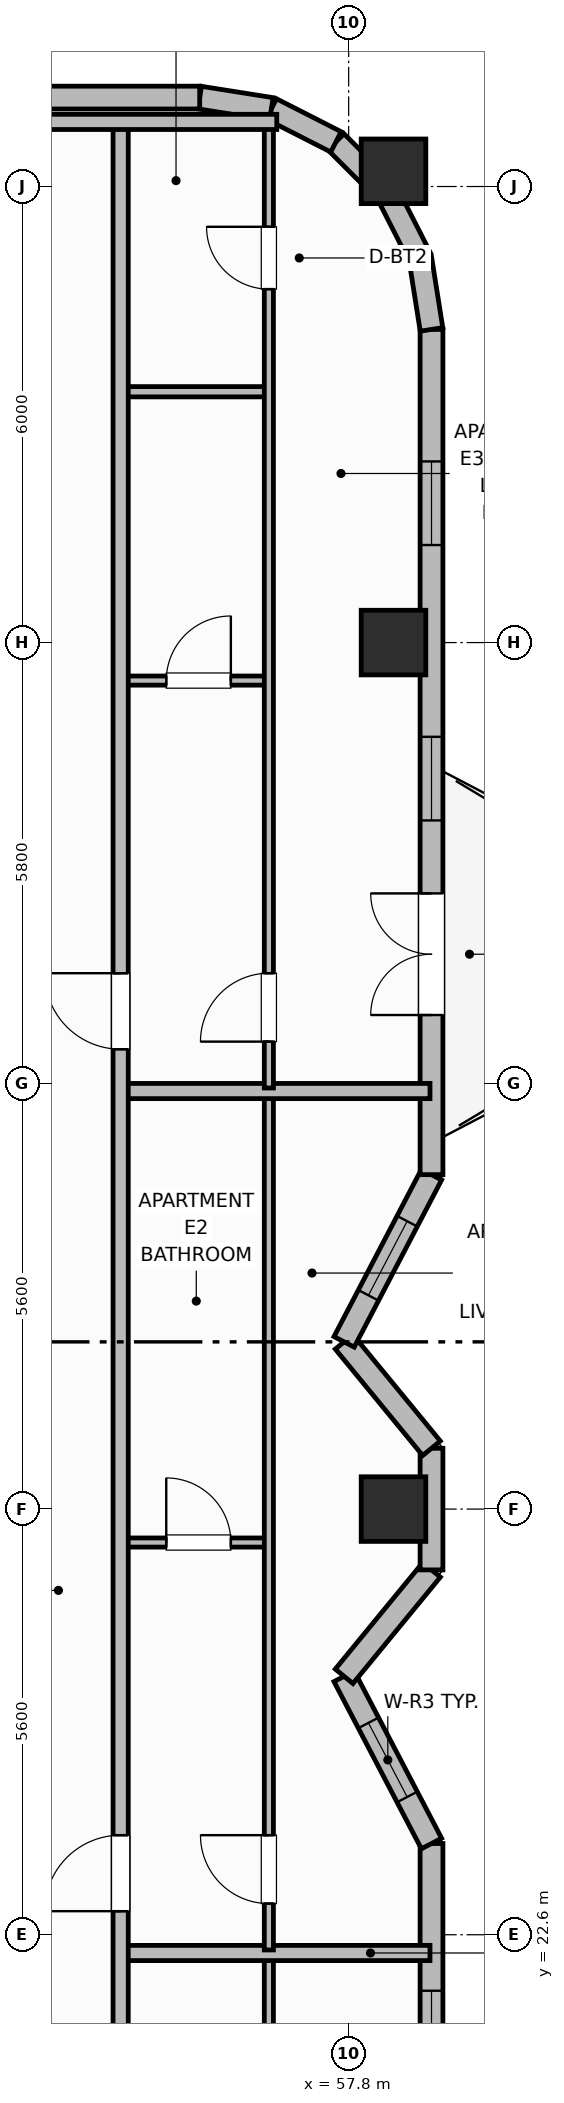
"""IFC4 building model, lengths in metres.
Left out: names, types, materials, properties, quantities, classifications, styles, units other than length and angle.
Written with IfcOpenShell. Run it as: python <this file> out.ifc"""

import sys

from ifc_helpers import new_model, si_unit, direction, frame, frame_2d, origin, origin_2d, place, context, subcontext, project, spatial, rectangle, extrude, element, fill, save


model = new_model("IFC4")
c1 = context("Model", 3, precision=1e-05, world=origin(), true_north=direction((0.0, 1.0)))
c2 = subcontext(c1, "Body", "Model", "MODEL_VIEW")
j1 = project(units=[si_unit("LENGTHUNIT", "METRE"), si_unit("PLANEANGLEUNIT", "RADIAN")], contexts=[c1])
p1 = place(None, origin())
s1 = spatial("IfcSite", under=j1, at=p1, CompositionType="ELEMENT")
p2 = place(p1, origin())
s2 = spatial("IfcBuilding", under=s1, at=p2, CompositionType="ELEMENT")
p3 = place(p2, frame((0.0, 0.0, 244.3)))
s3 = spatial("IfcBuildingStorey", under=s2, at=p3, CompositionType="ELEMENT", Elevation=244.3)
for number, where, z_axis, x_axis in (
    (1, (58.39, 28.2, 0.0), (0.0, 0.0, 1.0), (1.0, 0.0, 0.0)),
    (2, (58.39, 39.6, 0.0), (0.0, 0.0, 1.0), (1.0, 0.0, 0.0)),
    (3, (58.39, 45.8, 0.0), (0.0, 0.0, 1.0), (1.0, 0.0, 0.0)),
):
    element("IfcColumn", number, at=place(p3, frame(where, z_axis=z_axis, x_axis=x_axis)), inside=s3, PredefinedType="COLUMN", context=c2, shape_type="SweptSolid", body=[
        extrude(rectangle(XDim=0.85, YDim=0.85, at=origin_2d()), origin(), (0.0, 0.0, 1.0), 3.7),
    ])
p4 = place(p3, frame((58.89, 12.68, 0.0), z_axis=(0.0, 0.0, 1.0), x_axis=(0.0, 1.0, 0.0)))
e4 = element("IfcWall", 4, at=p4, inside=s3, PredefinedType="SOLIDWALL", context=c2, shape_type="SweptSolid", body=[
    extrude(rectangle(XDim=11.12, YDim=0.3, at=frame_2d((5.56, 0.0))), origin(), (0.0, 0.0, 1.0), 2.73),
])
p5 = place(p4, frame((1.237, 0.0, 0.76)))
e5 = element("IfcOpeningElement", 5, at=p5, cuts=e4, PredefinedType="OPENING", context=c2, shape_type="SweptSolid", body=[
    extrude(rectangle(XDim=1.4, YDim=1.85, at=frame_2d((0.7, 0.925))), frame((0.0, 0.16, 0.0), z_axis=(0.0, -1.0, 0.0), x_axis=(1.0, 0.0, 0.0)), (0.0, 0.0, 1.0), 0.32),
])
p6 = place(p4, frame((5.56, 0.0, 0.76)))
e6 = element("IfcOpeningElement", 6, at=p6, cuts=e4, PredefinedType="OPENING", context=c2, shape_type="SweptSolid", body=[
    extrude(rectangle(XDim=1.4, YDim=1.85, at=frame_2d((0.7, 0.925))), frame((0.0, 0.16, 0.0), z_axis=(0.0, -1.0, 0.0), x_axis=(1.0, 0.0, 0.0)), (0.0, 0.0, 1.0), 0.32),
])
p7 = place(p4, frame((7.783, 0.0, 0.76)))
e7 = element("IfcOpeningElement", 7, at=p7, cuts=e4, PredefinedType="OPENING", context=c2, shape_type="SweptSolid", body=[
    extrude(rectangle(XDim=1.4, YDim=1.85, at=frame_2d((0.7, 0.925))), frame((0.0, 0.16, 0.0), z_axis=(0.0, -1.0, 0.0), x_axis=(1.0, 0.0, 0.0)), (0.0, 0.0, 1.0), 0.32),
])
p8 = place(p3, frame((58.89, 23.8, 0.0), z_axis=(0.0, 0.0, 1.0), x_axis=(-0.46323138706, 0.886237373418, 0.0)))
e8 = element("IfcWall", 8, at=p8, inside=s3, PredefinedType="SOLIDWALL", context=c2, shape_type="SweptSolid", body=[
    extrude(rectangle(XDim=2.482, YDim=0.3, at=frame_2d((1.241, 0.0))), origin(), (0.0, 0.0, 1.0), 2.73),
])
p9 = place(p8, frame((0.691, 0.0, 0.92)))
e9 = element("IfcOpeningElement", 9, at=p9, cuts=e8, PredefinedType="OPENING", context=c2, shape_type="SweptSolid", body=[
    extrude(rectangle(XDim=1.1, YDim=1.65, at=frame_2d((0.55, 0.825))), frame((0.0, 0.16, 0.0), z_axis=(0.0, -1.0, 0.0), x_axis=(1.0, 0.0, 0.0)), (0.0, 0.0, 1.0), 0.32),
])
p10 = place(p3, frame((57.74, 26.0, 0.0), z_axis=(0.0, 0.0, 1.0), x_axis=(0.634733675645, 0.772730975827, 0.0)))
e10 = element("IfcWall", 10, at=p10, inside=s3, PredefinedType="SOLIDWALL", context=c2, shape_type="SweptSolid", body=[
    extrude(rectangle(XDim=1.812, YDim=0.3, at=frame_2d((0.906, 0.0))), origin(), (0.0, 0.0, 1.0), 2.73),
])
p11 = place(p3, frame((58.89, 27.4, 0.0), z_axis=(0.0, 0.0, 1.0), x_axis=(0.0, 1.0, 0.0)))
e11 = element("IfcWall", 11, at=p11, inside=s3, PredefinedType="SOLIDWALL", context=c2, shape_type="SweptSolid", body=[
    extrude(rectangle(XDim=1.6, YDim=0.3, at=frame_2d((0.8, 0.0))), origin(), (0.0, 0.0, 1.0), 2.73),
])
p12 = place(p3, frame((58.89, 29.0, 0.0), z_axis=(0.0, 0.0, 1.0), x_axis=(-0.634733675645, 0.772730975827, 0.0)))
e12 = element("IfcWall", 12, at=p12, inside=s3, PredefinedType="SOLIDWALL", context=c2, shape_type="SweptSolid", body=[
    extrude(rectangle(XDim=1.812, YDim=0.3, at=frame_2d((0.906, 0.0))), origin(), (0.0, 0.0, 1.0), 2.73),
])
p13 = place(p3, frame((57.74, 30.4, 0.0), z_axis=(0.0, 0.0, 1.0), x_axis=(0.463191013929, 0.88625847506, 0.0)))
e13 = element("IfcWall", 13, at=p13, inside=s3, PredefinedType="SOLIDWALL", context=c2, shape_type="SweptSolid", body=[
    extrude(rectangle(XDim=2.483, YDim=0.3, at=frame_2d((1.241, 0.0))), origin(), (0.0, 0.0, 1.0), 2.73),
])
p14 = place(p13, frame((0.691, 0.0, 0.92)))
e14 = element("IfcOpeningElement", 14, at=p14, cuts=e13, PredefinedType="OPENING", context=c2, shape_type="SweptSolid", body=[
    extrude(rectangle(XDim=1.1, YDim=1.65, at=frame_2d((0.55, 0.825))), frame((0.0, 0.16, 0.0), z_axis=(0.0, -1.0, 0.0), x_axis=(1.0, 0.0, 0.0)), (0.0, 0.0, 1.0), 0.32),
])
p15 = place(p3, frame((58.89, 32.6, 0.0), z_axis=(0.0, 0.0, 1.0), x_axis=(0.0, 1.0, 0.0)))
e15 = element("IfcWall", 15, at=p15, inside=s3, PredefinedType="SOLIDWALL", context=c2, shape_type="SweptSolid", body=[
    extrude(rectangle(XDim=11.12, YDim=0.3, at=frame_2d((5.56, 0.0))), origin(), (0.0, 0.0, 1.0), 2.73),
])
p16 = place(p15, frame((2.1, 0.0, 0.0)))
e16 = element("IfcOpeningElement", 16, at=p16, cuts=e15, PredefinedType="OPENING", context=c2, shape_type="SweptSolid", body=[
    extrude(rectangle(XDim=1.6, YDim=2.1, at=frame_2d((0.8, 1.05))), frame((0.0, 0.16, 0.0), z_axis=(0.0, -1.0, 0.0), x_axis=(1.0, 0.0, 0.0)), (0.0, 0.0, 1.0), 0.32),
])
p17 = place(p15, frame((4.66, 0.0, 0.95)))
e17 = element("IfcOpeningElement", 17, at=p17, cuts=e15, PredefinedType="OPENING", context=c2, shape_type="SweptSolid", body=[
    extrude(rectangle(XDim=1.1, YDim=1.65, at=frame_2d((0.55, 0.825))), frame((0.0, 0.16, 0.0), z_axis=(0.0, -1.0, 0.0), x_axis=(1.0, 0.0, 0.0)), (0.0, 0.0, 1.0), 0.32),
])
p18 = place(p15, frame((8.283, 0.0, 0.95)))
e18 = element("IfcOpeningElement", 18, at=p18, cuts=e15, PredefinedType="OPENING", context=c2, shape_type="SweptSolid", body=[
    extrude(rectangle(XDim=1.1, YDim=1.65, at=frame_2d((0.55, 0.825))), frame((0.0, 0.16, 0.0), z_axis=(0.0, -1.0, 0.0), x_axis=(1.0, 0.0, 0.0)), (0.0, 0.0, 1.0), 0.32),
])
p19 = place(p3, frame((58.89, 43.72, 0.0), z_axis=(0.0, 0.0, 1.0), x_axis=(-0.156304114255, 0.987708977314, 0.0)))
e19 = element("IfcWall", 19, at=p19, inside=s3, PredefinedType="SOLIDWALL", context=c2, shape_type="SweptSolid", body=[
    extrude(rectangle(XDim=0.954, YDim=0.3, at=frame_2d((0.477, 0.0))), origin(), (0.0, 0.0, 1.0), 2.73),
])
p20 = place(p3, frame((58.741, 44.663, 0.0), z_axis=(0.0, 0.0, 1.0), x_axis=(-0.45395644796, 0.891023873617, 0.0)))
e20 = element("IfcWall", 20, at=p20, inside=s3, PredefinedType="SOLIDWALL", context=c2, shape_type="SweptSolid", body=[
    extrude(rectangle(XDim=0.954, YDim=0.3, at=frame_2d((0.477, 0.0))), origin(), (0.0, 0.0, 1.0), 2.73),
])
for number, where, z_axis, x_axis in (
    (21, (58.308, 45.513, 0.0), (0.0, 0.0, 1.0), (-0.707, 0.707, 0.0)),
    (22, (57.633, 46.188, 0.0), (0.0, 0.0, 1.0), (-0.891, 0.454, 0.0)),
):
    element("IfcWall", number, at=place(p3, frame(where, z_axis=z_axis, x_axis=x_axis)), inside=s3, PredefinedType="SOLIDWALL", context=c2, shape_type="SweptSolid", body=[
        extrude(rectangle(XDim=0.954, YDim=0.3, at=frame_2d((0.477, 0.0))), origin(), (0.0, 0.0, 1.0), 2.73),
    ])
p21 = place(p3, frame((56.782, 46.621, 0.0), z_axis=(0.0, 0.0, 1.0), x_axis=(-0.987663181641, 0.156593229835, 0.0)))
e23 = element("IfcWall", 23, at=p21, inside=s3, PredefinedType="SOLIDWALL", context=c2, shape_type="SweptSolid", body=[
    extrude(rectangle(XDim=0.954, YDim=0.3, at=frame_2d((0.477, 0.0))), origin(), (0.0, 0.0, 1.0), 2.73),
])
p22 = place(p3, frame((55.84, 46.77, 0.0), z_axis=(0.0, 0.0, 1.0), x_axis=(-1.0, 0.0, 0.0)))
e24 = element("IfcWall", 24, at=p22, inside=s3, PredefinedType="SOLIDWALL", context=c2, shape_type="SweptSolid", body=[
    extrude(rectangle(XDim=33.28, YDim=0.3, at=frame_2d((16.64, 0.0))), origin(), (0.0, 0.0, 1.0), 2.73),
])
p23 = place(p22, frame((4.93, 0.0, 0.71)))
e25 = element("IfcOpeningElement", 25, at=p23, cuts=e24, PredefinedType="OPENING", context=c2, shape_type="SweptSolid", body=[
    extrude(rectangle(XDim=2.1, YDim=1.9, at=frame_2d((1.05, 0.95))), frame((0.0, 0.16, 0.0), z_axis=(0.0, -1.0, 0.0), x_axis=(1.0, 0.0, 0.0)), (0.0, 0.0, 1.0), 0.32),
])
p24 = place(p22, frame((8.483, 0.0, 0.71)))
e26 = element("IfcOpeningElement", 26, at=p24, cuts=e24, PredefinedType="OPENING", context=c2, shape_type="SweptSolid", body=[
    extrude(rectangle(XDim=2.1, YDim=1.9, at=frame_2d((1.05, 0.95))), frame((0.0, 0.16, 0.0), z_axis=(0.0, -1.0, 0.0), x_axis=(1.0, 0.0, 0.0)), (0.0, 0.0, 1.0), 0.32),
])
p25 = place(p22, frame((15.59, 0.0, 0.71)))
e27 = element("IfcOpeningElement", 27, at=p25, cuts=e24, PredefinedType="OPENING", context=c2, shape_type="SweptSolid", body=[
    extrude(rectangle(XDim=2.1, YDim=1.9, at=frame_2d((1.05, 0.95))), frame((0.0, 0.16, 0.0), z_axis=(0.0, -1.0, 0.0), x_axis=(1.0, 0.0, 0.0)), (0.0, 0.0, 1.0), 0.32),
])
p26 = place(p22, frame((22.697, 0.0, 0.71)))
e28 = element("IfcOpeningElement", 28, at=p26, cuts=e24, PredefinedType="OPENING", context=c2, shape_type="SweptSolid", body=[
    extrude(rectangle(XDim=2.1, YDim=1.9, at=frame_2d((1.05, 0.95))), frame((0.0, 0.16, 0.0), z_axis=(0.0, -1.0, 0.0), x_axis=(1.0, 0.0, 0.0)), (0.0, 0.0, 1.0), 0.32),
])
p27 = place(p22, frame((26.25, 0.0, 0.71)))
e29 = element("IfcOpeningElement", 29, at=p27, cuts=e24, PredefinedType="OPENING", context=c2, shape_type="SweptSolid", body=[
    extrude(rectangle(XDim=2.1, YDim=1.9, at=frame_2d((1.05, 0.95))), frame((0.0, 0.16, 0.0), z_axis=(0.0, -1.0, 0.0), x_axis=(1.0, 0.0, 0.0)), (0.0, 0.0, 1.0), 0.32),
])
p28 = place(p3, frame((56.75, 9.99, 0.0), z_axis=(0.0, 0.0, 1.0), x_axis=(0.0, 1.0, 0.0)))
e30 = element("IfcWall", 30, at=p28, inside=s3, PredefinedType="PARTITIONING", context=c2, shape_type="SweptSolid", body=[
    extrude(rectangle(XDim=12.33, YDim=0.12, at=frame_2d((6.165, 0.0))), origin(), (0.0, 0.0, 1.0), 2.56),
])
p29 = place(p28, frame((0.41, 0.0, 0.0)))
e31 = element("IfcOpeningElement", 31, at=p29, cuts=e30, PredefinedType="OPENING", context=c2, shape_type="SweptSolid", body=[
    extrude(rectangle(XDim=0.9, YDim=2.1, at=frame_2d((0.45, 1.05))), frame((0.0, 0.07, 0.0), z_axis=(0.0, -1.0, 0.0), x_axis=(1.0, 0.0, 0.0)), (0.0, 0.0, 1.0), 0.14),
])
p30 = place(p28, frame((10.34, 0.0, 0.0)))
e32 = element("IfcOpeningElement", 32, at=p30, cuts=e30, PredefinedType="OPENING", context=c2, shape_type="SweptSolid", body=[
    extrude(rectangle(XDim=0.82, YDim=2.08, at=frame_2d((0.41, 1.04))), frame((0.0, 0.07, 0.0), z_axis=(0.0, -1.0, 0.0), x_axis=(1.0, 0.0, 0.0)), (0.0, 0.0, 1.0), 0.14),
])
p31 = place(p3, frame((54.8, 22.36, 0.0), z_axis=(0.0, 0.0, 1.0), x_axis=(1.0, 0.0, 0.0)))
e33 = element("IfcWall", 33, at=p31, inside=s3, PredefinedType="PARTITIONING", context=c2, shape_type="SweptSolid", body=[
    extrude(rectangle(XDim=4.07, YDim=0.2, at=frame_2d((2.035, 0.0))), origin(), (0.0, 0.0, 1.0), 2.56),
])
p32 = place(p3, frame((54.8, 27.76, 0.0), z_axis=(0.0, 0.0, 1.0), x_axis=(1.0, 0.0, 0.0)))
e34 = element("IfcWall", 34, at=p32, inside=s3, PredefinedType="PARTITIONING", context=c2, shape_type="SweptSolid", body=[
    extrude(rectangle(XDim=1.95, YDim=0.12, at=frame_2d((0.975, 0.0))), origin(), (0.0, 0.0, 1.0), 2.56),
])
p33 = place(p32, frame((0.6, 0.0, 0.0)))
e35 = element("IfcOpeningElement", 35, at=p33, cuts=e34, PredefinedType="OPENING", context=c2, shape_type="SweptSolid", body=[
    extrude(rectangle(XDim=0.85, YDim=2.1, at=frame_2d((0.425, 1.05))), frame((0.0, 0.07, 0.0), z_axis=(0.0, -1.0, 0.0), x_axis=(1.0, 0.0, 0.0)), (0.0, 0.0, 1.0), 0.14),
])
p34 = place(p3, frame((56.75, 22.4, 0.0), z_axis=(0.0, 0.0, 1.0), x_axis=(0.0, 1.0, 0.0)))
e36 = element("IfcWall", 36, at=p34, inside=s3, PredefinedType="PARTITIONING", context=c2, shape_type="SweptSolid", body=[
    extrude(rectangle(XDim=11.26, YDim=0.12, at=frame_2d((5.63, 0.0))), origin(), (0.0, 0.0, 1.0), 2.56),
])
p35 = place(p34, frame((0.61, 0.0, 0.0)))
e37 = element("IfcOpeningElement", 37, at=p35, cuts=e36, PredefinedType="OPENING", context=c2, shape_type="SweptSolid", body=[
    extrude(rectangle(XDim=0.9, YDim=2.1, at=frame_2d((0.45, 1.05))), frame((0.0, 0.07, 0.0), z_axis=(0.0, -1.0, 0.0), x_axis=(1.0, 0.0, 0.0)), (0.0, 0.0, 1.0), 0.14),
])
p36 = place(p3, frame((54.8, 33.7, 0.0), z_axis=(0.0, 0.0, 1.0), x_axis=(1.0, 0.0, 0.0)))
e38 = element("IfcWall", 38, at=p36, inside=s3, PredefinedType="PARTITIONING", context=c2, shape_type="SweptSolid", body=[
    extrude(rectangle(XDim=4.07, YDim=0.2, at=frame_2d((2.035, 0.0))), origin(), (0.0, 0.0, 1.0), 2.56),
])
p37 = place(p3, frame((54.8, 39.1, 0.0), z_axis=(0.0, 0.0, 1.0), x_axis=(1.0, 0.0, 0.0)))
e39 = element("IfcWall", 39, at=p37, inside=s3, PredefinedType="PARTITIONING", context=c2, shape_type="SweptSolid", body=[
    extrude(rectangle(XDim=1.95, YDim=0.12, at=frame_2d((0.975, 0.0))), origin(), (0.0, 0.0, 1.0), 2.56),
])
p38 = place(p37, frame((0.6, 0.0, 0.0)))
e40 = element("IfcOpeningElement", 40, at=p38, cuts=e39, PredefinedType="OPENING", context=c2, shape_type="SweptSolid", body=[
    extrude(rectangle(XDim=0.85, YDim=2.1, at=frame_2d((0.425, 1.05))), frame((0.0, 0.07, 0.0), z_axis=(0.0, -1.0, 0.0), x_axis=(1.0, 0.0, 0.0)), (0.0, 0.0, 1.0), 0.14),
])
p39 = place(p3, frame((54.8, 42.9, 0.0), z_axis=(0.0, 0.0, 1.0), x_axis=(1.0, 0.0, 0.0)))
e41 = element("IfcWall", 41, at=p39, inside=s3, PredefinedType="PARTITIONING", context=c2, shape_type="SweptSolid", body=[
    extrude(rectangle(XDim=1.95, YDim=0.135, at=frame_2d((0.975, 0.0))), origin(), (0.0, 0.0, 1.0), 2.56),
])
p40 = place(p3, frame((56.75, 33.74, 0.0), z_axis=(0.0, 0.0, 1.0), x_axis=(0.0, 1.0, 0.0)))
e42 = element("IfcWall", 42, at=p40, inside=s3, PredefinedType="PARTITIONING", context=c2, shape_type="SweptSolid", body=[
    extrude(rectangle(XDim=12.67, YDim=0.12, at=frame_2d((6.335, 0.0))), origin(), (0.0, 0.0, 1.0), 2.56),
])
p41 = place(p40, frame((0.61, 0.0, 0.0)))
e43 = element("IfcOpeningElement", 43, at=p41, cuts=e42, PredefinedType="OPENING", context=c2, shape_type="SweptSolid", body=[
    extrude(rectangle(XDim=0.9, YDim=2.1, at=frame_2d((0.45, 1.05))), frame((0.0, 0.07, 0.0), z_axis=(0.0, -1.0, 0.0), x_axis=(1.0, 0.0, 0.0)), (0.0, 0.0, 1.0), 0.14),
])
p42 = place(p40, frame((10.51, 0.0, 0.0)))
e44 = element("IfcOpeningElement", 44, at=p42, cuts=e42, PredefinedType="OPENING", context=c2, shape_type="SweptSolid", body=[
    extrude(rectangle(XDim=0.82, YDim=2.08, at=frame_2d((0.41, 1.04))), frame((0.0, 0.07, 0.0), z_axis=(0.0, -1.0, 0.0), x_axis=(1.0, 0.0, 0.0)), (0.0, 0.0, 1.0), 0.14),
])
p43 = place(p3, frame((54.8, 9.95, 0.0), z_axis=(0.0, 0.0, 1.0), x_axis=(0.0, 1.0, 0.0)))
e45 = element("IfcWall", 45, at=p43, inside=s3, PredefinedType="PARTITIONING", context=c2, shape_type="SweptSolid", body=[
    extrude(rectangle(XDim=36.5, YDim=0.2, at=frame_2d((18.25, 0.0))), origin(), (0.0, 0.0, 1.0), 2.56),
])
p44 = place(p43, frame((3.25, 0.0, 0.0)))
e46 = element("IfcOpeningElement", 46, at=p44, cuts=e45, PredefinedType="OPENING", context=c2, shape_type="SweptSolid", body=[
    extrude(rectangle(XDim=1.0, YDim=2.15, at=frame_2d((0.5, 1.075))), frame((0.0, 0.11, 0.0), z_axis=(0.0, -1.0, 0.0), x_axis=(1.0, 0.0, 0.0)), (0.0, 0.0, 1.0), 0.22),
])
p45 = place(p43, frame((12.96, 0.0, 0.0)))
e47 = element("IfcOpeningElement", 47, at=p45, cuts=e45, PredefinedType="OPENING", context=c2, shape_type="SweptSolid", body=[
    extrude(rectangle(XDim=1.0, YDim=2.15, at=frame_2d((0.5, 1.075))), frame((0.0, 0.11, 0.0), z_axis=(0.0, -1.0, 0.0), x_axis=(1.0, 0.0, 0.0)), (0.0, 0.0, 1.0), 0.22),
])
p46 = place(p43, frame((24.3, 0.0, 0.0)))
e48 = element("IfcOpeningElement", 48, at=p46, cuts=e45, PredefinedType="OPENING", context=c2, shape_type="SweptSolid", body=[
    extrude(rectangle(XDim=1.0, YDim=2.15, at=frame_2d((0.5, 1.075))), frame((0.0, 0.11, 0.0), z_axis=(0.0, -1.0, 0.0), x_axis=(1.0, 0.0, 0.0)), (0.0, 0.0, 1.0), 0.22),
])
p47 = place(p3, frame((53.1, 46.45, 0.0), z_axis=(0.0, 0.0, 1.0), x_axis=(1.0, 0.0, 0.0)))
e49 = element("IfcWall", 49, at=p47, inside=s3, PredefinedType="PARTITIONING", context=c2, shape_type="SweptSolid", body=[
    extrude(rectangle(XDim=3.754, YDim=0.2, at=frame_2d((1.877, 0.0))), origin(), (0.0, 0.0, 1.0), 2.56),
])
p48 = place(p7, origin())
e50 = element("IfcWindow", 50, at=p48, inside=s3, PartitioningType="SINGLE_PANEL", PredefinedType="WINDOW", context=c2, shape_type="SweptSolid", body=[
    extrude(rectangle(XDim=1.4, YDim=1.85, at=frame_2d((0.7, 0.925))), frame((0.0, 0.03, 0.0), z_axis=(0.0, -1.0, 0.0), x_axis=(1.0, 0.0, 0.0)), (0.0, 0.0, 1.0), 0.06),
])
fill(e7, e50)
p49 = place(p9, origin())
e51 = element("IfcWindow", 51, at=p49, inside=s3, PartitioningType="SINGLE_PANEL", PredefinedType="WINDOW", context=c2, shape_type="SweptSolid", body=[
    extrude(rectangle(XDim=1.1, YDim=1.65, at=frame_2d((0.55, 0.825))), frame((0.0, 0.03, 0.0), z_axis=(0.0, -1.0, 0.0), x_axis=(1.0, 0.0, 0.0)), (0.0, 0.0, 1.0), 0.06),
])
fill(e9, e51)
p50 = place(p14, origin())
e52 = element("IfcWindow", 52, at=p50, inside=s3, PartitioningType="SINGLE_PANEL", PredefinedType="WINDOW", context=c2, shape_type="SweptSolid", body=[
    extrude(rectangle(XDim=1.1, YDim=1.65, at=frame_2d((0.55, 0.825))), frame((0.0, 0.03, 0.0), z_axis=(0.0, -1.0, 0.0), x_axis=(1.0, 0.0, 0.0)), (0.0, 0.0, 1.0), 0.06),
])
fill(e14, e52)
p51 = place(p16, origin())
e53 = element("IfcDoor", 53, at=p51, inside=s3, OperationType="DOUBLE_DOOR_SINGLE_SWING", PredefinedType="DOOR", context=c2, shape_type="SweptSolid", body=[
    extrude(rectangle(XDim=1.6, YDim=2.1, at=frame_2d((0.8, 1.05))), frame((0.0, 0.025, 0.0), z_axis=(0.0, -1.0, 0.0), x_axis=(1.0, 0.0, 0.0)), (0.0, 0.0, 1.0), 0.05),
])
fill(e16, e53)
p52 = place(p17, origin())
e54 = element("IfcWindow", 54, at=p52, inside=s3, PartitioningType="SINGLE_PANEL", PredefinedType="WINDOW", context=c2, shape_type="SweptSolid", body=[
    extrude(rectangle(XDim=1.1, YDim=1.65, at=frame_2d((0.55, 0.825))), frame((0.0, 0.03, 0.0), z_axis=(0.0, -1.0, 0.0), x_axis=(1.0, 0.0, 0.0)), (0.0, 0.0, 1.0), 0.06),
])
fill(e17, e54)
p53 = place(p18, origin())
e55 = element("IfcWindow", 55, at=p53, inside=s3, PartitioningType="SINGLE_PANEL", PredefinedType="WINDOW", context=c2, shape_type="SweptSolid", body=[
    extrude(rectangle(XDim=1.1, YDim=1.65, at=frame_2d((0.55, 0.825))), frame((0.0, 0.03, 0.0), z_axis=(0.0, -1.0, 0.0), x_axis=(1.0, 0.0, 0.0)), (0.0, 0.0, 1.0), 0.06),
])
fill(e18, e55)
p54 = place(p33, origin())
e56 = element("IfcDoor", 56, at=p54, inside=s3, OperationType="SINGLE_SWING_LEFT", PredefinedType="DOOR", context=c2, shape_type="SweptSolid", body=[
    extrude(rectangle(XDim=0.85, YDim=2.1, at=frame_2d((0.425, 1.05))), frame((0.0, 0.025, 0.0), z_axis=(0.0, -1.0, 0.0), x_axis=(1.0, 0.0, 0.0)), (0.0, 0.0, 1.0), 0.05),
])
fill(e35, e56)
p55 = place(p35, origin())
e57 = element("IfcDoor", 57, at=p55, inside=s3, OperationType="SINGLE_SWING_RIGHT", PredefinedType="DOOR", context=c2, shape_type="SweptSolid", body=[
    extrude(rectangle(XDim=0.9, YDim=2.1, at=frame_2d((0.45, 1.05))), frame((0.0, 0.025, 0.0), z_axis=(0.0, -1.0, 0.0), x_axis=(1.0, 0.0, 0.0)), (0.0, 0.0, 1.0), 0.05),
])
fill(e37, e57)
p56 = place(p38, origin())
e58 = element("IfcDoor", 58, at=p56, inside=s3, OperationType="SINGLE_SWING_RIGHT", PredefinedType="DOOR", context=c2, shape_type="SweptSolid", body=[
    extrude(rectangle(XDim=0.85, YDim=2.1, at=frame_2d((0.425, 1.05))), frame((0.0, 0.025, 0.0), z_axis=(0.0, -1.0, 0.0), x_axis=(1.0, 0.0, 0.0)), (0.0, 0.0, 1.0), 0.05),
])
fill(e40, e58)
p57 = place(p41, origin())
e59 = element("IfcDoor", 59, at=p57, inside=s3, OperationType="SINGLE_SWING_LEFT", PredefinedType="DOOR", context=c2, shape_type="SweptSolid", body=[
    extrude(rectangle(XDim=0.9, YDim=2.1, at=frame_2d((0.45, 1.05))), frame((0.0, 0.025, 0.0), z_axis=(0.0, -1.0, 0.0), x_axis=(1.0, 0.0, 0.0)), (0.0, 0.0, 1.0), 0.05),
])
fill(e43, e59)
p58 = place(p42, origin())
e60 = element("IfcDoor", 60, at=p58, inside=s3, OperationType="SINGLE_SWING_RIGHT", PredefinedType="DOOR", context=c2, shape_type="SweptSolid", body=[
    extrude(rectangle(XDim=0.82, YDim=2.08, at=frame_2d((0.41, 1.04))), frame((0.0, 0.025, 0.0), z_axis=(0.0, -1.0, 0.0), x_axis=(1.0, 0.0, 0.0)), (0.0, 0.0, 1.0), 0.05),
])
fill(e44, e60)
p59 = place(p45, origin())
e61 = element("IfcDoor", 61, at=p59, inside=s3, OperationType="SINGLE_SWING_LEFT", PredefinedType="DOOR", context=c2, shape_type="SweptSolid", body=[
    extrude(rectangle(XDim=1.0, YDim=2.15, at=frame_2d((0.5, 1.075))), frame((0.0, 0.025, 0.0), z_axis=(0.0, -1.0, 0.0), x_axis=(1.0, 0.0, 0.0)), (0.0, 0.0, 1.0), 0.05),
])
fill(e47, e61)
p60 = place(p46, origin())
e62 = element("IfcDoor", 62, at=p60, inside=s3, OperationType="SINGLE_SWING_RIGHT", PredefinedType="DOOR", context=c2, shape_type="SweptSolid", body=[
    extrude(rectangle(XDim=1.0, YDim=2.15, at=frame_2d((0.5, 1.075))), frame((0.0, 0.025, 0.0), z_axis=(0.0, -1.0, 0.0), x_axis=(1.0, 0.0, 0.0)), (0.0, 0.0, 1.0), 0.05),
])
fill(e48, e62)
save(model, sys.argv[1])
